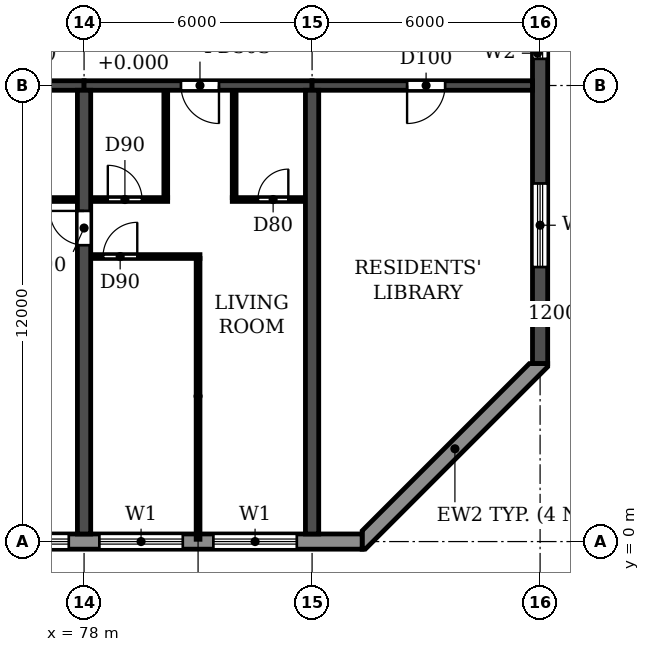
"""IFC4 building model, lengths in metres.
Left out: names, types, materials, properties, quantities, classifications, styles, units other than length and angle.
Written with IfcOpenShell. Run it as: python <this file> out.ifc"""

import sys

from ifc_helpers import new_model, si_unit, direction, frame, frame_2d, origin, place, context, subcontext, project, spatial, polyline, rectangle, outline, extrude, element, fill, save


model = new_model("IFC4")
c1 = context("Model", 3, precision=1e-05, world=origin(), true_north=direction((0.0, 1.0)))
c2 = subcontext(c1, "Body", "Model", "MODEL_VIEW")
j1 = project(units=[si_unit("LENGTHUNIT", "METRE"), si_unit("PLANEANGLEUNIT", "RADIAN")], contexts=[c1])
p1 = place(None, origin())
s1 = spatial("IfcSite", under=j1, at=p1, CompositionType="ELEMENT")
p2 = place(p1, origin())
s2 = spatial("IfcBuilding", under=s1, at=p2, CompositionType="ELEMENT")
p3 = place(p2, frame((0.0, 0.0, 112.5)))
s3 = spatial("IfcBuildingStorey", under=s2, at=p3, CompositionType="ELEMENT", Elevation=112.5)
p4 = place(p3, frame((78.0, 0.2, 0.0), z_axis=(0.0, 0.0, 1.0), x_axis=(0.0, 1.0, 0.0)))
e1 = element("IfcWall", 1, at=p4, inside=s3, PredefinedType="SHEAR", context=c2, shape_type="SweptSolid", body=[
    extrude(rectangle(XDim=11.675, YDim=0.35, at=frame_2d((5.837, 0.0))), origin(), (0.0, 0.0, 1.0), 2.95),
])
p5 = place(p4, frame((7.6, 0.0, 0.0)))
e2 = element("IfcOpeningElement", 2, at=p5, cuts=e1, PredefinedType="OPENING", context=c2, shape_type="SweptSolid", body=[
    extrude(rectangle(XDim=0.9, YDim=2.1, at=frame_2d((0.45, 1.05))), frame((0.0, 0.185, 0.0), z_axis=(0.0, -1.0, 0.0), x_axis=(1.0, 0.0, 0.0)), (0.0, 0.0, 1.0), 0.37),
])
p6 = place(p3, frame((84.0, 0.2, 0.0), z_axis=(0.0, 0.0, 1.0), x_axis=(0.0, 1.0, 0.0)))
e3 = element("IfcWall", 3, at=p6, inside=s3, PredefinedType="SHEAR", context=c2, shape_type="SweptSolid", body=[
    extrude(rectangle(XDim=11.675, YDim=0.35, at=frame_2d((5.837, 0.0))), origin(), (0.0, 0.0, 1.0), 2.95),
])
p7 = place(p3, frame((90.0, 4.683, 0.0), z_axis=(0.0, 0.0, 1.0), x_axis=(0.0, 1.0, 0.0)))
e4 = element("IfcWall", 4, at=p7, inside=s3, PredefinedType="SHEAR", context=c2, shape_type="SweptSolid", body=[
    extrude(rectangle(XDim=34.234, YDim=0.4, at=frame_2d((17.117, 0.0))), origin(), (0.0, 0.0, 1.0), 2.95),
])
p8 = place(p7, frame((15.917, 0.0, 0.9)))
e5 = element("IfcOpeningElement", 5, at=p8, cuts=e4, PredefinedType="OPENING", context=c2, shape_type="SweptSolid", body=[
    extrude(rectangle(XDim=1.2, YDim=1.5, at=frame_2d((0.6, 0.75))), frame((0.0, 0.21, 0.0), z_axis=(0.0, -1.0, 0.0), x_axis=(1.0, 0.0, 0.0)), (0.0, 0.0, 1.0), 0.42),
])
p9 = place(p7, frame((23.817, 0.0, 0.9)))
e6 = element("IfcOpeningElement", 6, at=p9, cuts=e4, PredefinedType="OPENING", context=c2, shape_type="SweptSolid", body=[
    extrude(rectangle(XDim=1.2, YDim=1.5, at=frame_2d((0.6, 0.75))), frame((0.0, 0.21, 0.0), z_axis=(0.0, -1.0, 0.0), x_axis=(1.0, 0.0, 0.0)), (0.0, 0.0, 1.0), 0.42),
])
p10 = place(p7, frame((8.017, 0.0, 0.9)))
e7 = element("IfcOpeningElement", 7, at=p10, cuts=e4, PredefinedType="OPENING", context=c2, shape_type="SweptSolid", body=[
    extrude(rectangle(XDim=1.2, YDim=1.5, at=frame_2d((0.6, 0.75))), frame((0.0, 0.21, 0.0), z_axis=(0.0, -1.0, 0.0), x_axis=(1.0, 0.0, 0.0)), (0.0, 0.0, 1.0), 0.42),
])
p11 = place(p7, frame((28.894, 0.0, 0.6)))
e8 = element("IfcOpeningElement", 8, at=p11, cuts=e4, PredefinedType="OPENING", context=c2, shape_type="SweptSolid", body=[
    extrude(rectangle(XDim=2.2, YDim=1.8, at=frame_2d((1.1, 0.9))), frame((0.0, 0.21, 0.0), z_axis=(0.0, -1.0, 0.0), x_axis=(1.0, 0.0, 0.0)), (0.0, 0.0, 1.0), 0.42),
])
p12 = place(p7, frame((2.541, 0.0, 0.6)))
e9 = element("IfcOpeningElement", 9, at=p12, cuts=e4, PredefinedType="OPENING", context=c2, shape_type="SweptSolid", body=[
    extrude(rectangle(XDim=2.2, YDim=1.8, at=frame_2d((1.1, 0.9))), frame((0.0, 0.21, 0.0), z_axis=(0.0, -1.0, 0.0), x_axis=(1.0, 0.0, 0.0)), (0.0, 0.0, 1.0), 0.42),
])
p13 = place(p3, frame((72.0, 12.0, 0.0), z_axis=(0.0, 0.0, 1.0), x_axis=(1.0, 0.0, 0.0)))
e10 = element("IfcWall", 10, at=p13, inside=s3, PredefinedType="SHEAR", context=c2, shape_type="SweptSolid", body=[
    extrude(rectangle(XDim=6.0, YDim=0.25, at=frame_2d((3.0, 0.0))), origin(), (0.0, 0.0, 1.0), 2.35),
])
p14 = place(p3, frame((78.0, 12.0, 0.0), z_axis=(0.0, 0.0, 1.0), x_axis=(1.0, 0.0, 0.0)))
e11 = element("IfcWall", 11, at=p14, inside=s3, PredefinedType="SHEAR", context=c2, shape_type="SweptSolid", body=[
    extrude(rectangle(XDim=6.0, YDim=0.25, at=frame_2d((3.0, 0.0))), origin(), (0.0, 0.0, 1.0), 2.35),
])
p15 = place(p14, frame((2.55, 0.0, 0.0)))
e12 = element("IfcOpeningElement", 12, at=p15, cuts=e11, PredefinedType="OPENING", context=c2, shape_type="SweptSolid", body=[
    extrude(rectangle(XDim=1.0, YDim=2.1, at=frame_2d((0.5, 1.05))), frame((0.0, 0.135, 0.0), z_axis=(0.0, -1.0, 0.0), x_axis=(1.0, 0.0, 0.0)), (0.0, 0.0, 1.0), 0.27),
])
p16 = place(p3, frame((84.0, 12.0, 0.0), z_axis=(0.0, 0.0, 1.0), x_axis=(1.0, 0.0, 0.0)))
e13 = element("IfcWall", 13, at=p16, inside=s3, PredefinedType="SHEAR", context=c2, shape_type="SweptSolid", body=[
    extrude(rectangle(XDim=5.8, YDim=0.25, at=frame_2d((2.9, 0.0))), origin(), (0.0, 0.0, 1.0), 2.35),
])
p17 = place(p16, frame((2.5, 0.0, 0.0)))
e14 = element("IfcOpeningElement", 14, at=p17, cuts=e13, PredefinedType="OPENING", context=c2, shape_type="SweptSolid", body=[
    extrude(rectangle(XDim=1.0, YDim=2.1, at=frame_2d((0.5, 1.05))), frame((0.0, 0.135, 0.0), z_axis=(0.0, -1.0, 0.0), x_axis=(1.0, 0.0, 0.0)), (0.0, 0.0, 1.0), 0.27),
])
p18 = place(p3, frame((16.683, 0.0, 0.0), z_axis=(0.0, 0.0, 1.0), x_axis=(1.0, 0.0, 0.0)))
e15 = element("IfcWall", 15, at=p18, inside=s3, PredefinedType="STANDARD", context=c2, shape_type="SweptSolid", body=[
    extrude(rectangle(XDim=68.634, YDim=0.4, at=frame_2d((34.317, 0.0))), origin(), (0.0, 0.0, 1.0), 2.95),
])
p19 = place(p18, frame((1.717, 0.0, 0.9)))
e16 = element("IfcOpeningElement", 16, at=p19, cuts=e15, PredefinedType="OPENING", context=c2, shape_type="SweptSolid", body=[
    extrude(rectangle(XDim=2.2, YDim=1.5, at=frame_2d((1.1, 0.75))), frame((0.0, 0.21, 0.0), z_axis=(0.0, -1.0, 0.0), x_axis=(1.0, 0.0, 0.0)), (0.0, 0.0, 1.0), 0.42),
])
p20 = place(p18, frame((4.717, 0.0, 0.9)))
e17 = element("IfcOpeningElement", 17, at=p20, cuts=e15, PredefinedType="OPENING", context=c2, shape_type="SweptSolid", body=[
    extrude(rectangle(XDim=2.2, YDim=1.5, at=frame_2d((1.1, 0.75))), frame((0.0, 0.21, 0.0), z_axis=(0.0, -1.0, 0.0), x_axis=(1.0, 0.0, 0.0)), (0.0, 0.0, 1.0), 0.42),
])
p21 = place(p18, frame((7.717, 0.0, 0.9)))
e18 = element("IfcOpeningElement", 18, at=p21, cuts=e15, PredefinedType="OPENING", context=c2, shape_type="SweptSolid", body=[
    extrude(rectangle(XDim=2.2, YDim=1.5, at=frame_2d((1.1, 0.75))), frame((0.0, 0.21, 0.0), z_axis=(0.0, -1.0, 0.0), x_axis=(1.0, 0.0, 0.0)), (0.0, 0.0, 1.0), 0.42),
])
p22 = place(p18, frame((10.917, 0.0, 0.0)))
e19 = element("IfcOpeningElement", 19, at=p22, cuts=e15, PredefinedType="OPENING", context=c2, shape_type="SweptSolid", body=[
    extrude(rectangle(XDim=1.8, YDim=2.4, at=frame_2d((0.9, 1.2))), frame((0.0, 0.21, 0.0), z_axis=(0.0, -1.0, 0.0), x_axis=(1.0, 0.0, 0.0)), (0.0, 0.0, 1.0), 0.42),
])
p23 = place(p18, frame((13.717, 0.0, 0.9)))
e20 = element("IfcOpeningElement", 20, at=p23, cuts=e15, PredefinedType="OPENING", context=c2, shape_type="SweptSolid", body=[
    extrude(rectangle(XDim=2.2, YDim=1.5, at=frame_2d((1.1, 0.75))), frame((0.0, 0.21, 0.0), z_axis=(0.0, -1.0, 0.0), x_axis=(1.0, 0.0, 0.0)), (0.0, 0.0, 1.0), 0.42),
])
p24 = place(p18, frame((16.717, 0.0, 0.9)))
e21 = element("IfcOpeningElement", 21, at=p24, cuts=e15, PredefinedType="OPENING", context=c2, shape_type="SweptSolid", body=[
    extrude(rectangle(XDim=2.2, YDim=1.5, at=frame_2d((1.1, 0.75))), frame((0.0, 0.21, 0.0), z_axis=(0.0, -1.0, 0.0), x_axis=(1.0, 0.0, 0.0)), (0.0, 0.0, 1.0), 0.42),
])
p25 = place(p18, frame((19.717, 0.0, 0.9)))
e22 = element("IfcOpeningElement", 22, at=p25, cuts=e15, PredefinedType="OPENING", context=c2, shape_type="SweptSolid", body=[
    extrude(rectangle(XDim=2.2, YDim=1.5, at=frame_2d((1.1, 0.75))), frame((0.0, 0.21, 0.0), z_axis=(0.0, -1.0, 0.0), x_axis=(1.0, 0.0, 0.0)), (0.0, 0.0, 1.0), 0.42),
])
p26 = place(p18, frame((22.717, 0.0, 0.9)))
e23 = element("IfcOpeningElement", 23, at=p26, cuts=e15, PredefinedType="OPENING", context=c2, shape_type="SweptSolid", body=[
    extrude(rectangle(XDim=2.2, YDim=1.5, at=frame_2d((1.1, 0.75))), frame((0.0, 0.21, 0.0), z_axis=(0.0, -1.0, 0.0), x_axis=(1.0, 0.0, 0.0)), (0.0, 0.0, 1.0), 0.42),
])
p27 = place(p18, frame((25.717, 0.0, 0.9)))
e24 = element("IfcOpeningElement", 24, at=p27, cuts=e15, PredefinedType="OPENING", context=c2, shape_type="SweptSolid", body=[
    extrude(rectangle(XDim=2.2, YDim=1.5, at=frame_2d((1.1, 0.75))), frame((0.0, 0.21, 0.0), z_axis=(0.0, -1.0, 0.0), x_axis=(1.0, 0.0, 0.0)), (0.0, 0.0, 1.0), 0.42),
])
p28 = place(p18, frame((28.717, 0.0, 0.9)))
e25 = element("IfcOpeningElement", 25, at=p28, cuts=e15, PredefinedType="OPENING", context=c2, shape_type="SweptSolid", body=[
    extrude(rectangle(XDim=2.2, YDim=1.5, at=frame_2d((1.1, 0.75))), frame((0.0, 0.21, 0.0), z_axis=(0.0, -1.0, 0.0), x_axis=(1.0, 0.0, 0.0)), (0.0, 0.0, 1.0), 0.42),
])
p29 = place(p18, frame((31.917, 0.0, 0.0)))
e26 = element("IfcOpeningElement", 26, at=p29, cuts=e15, PredefinedType="OPENING", context=c2, shape_type="SweptSolid", body=[
    extrude(rectangle(XDim=1.8, YDim=2.4, at=frame_2d((0.9, 1.2))), frame((0.0, 0.21, 0.0), z_axis=(0.0, -1.0, 0.0), x_axis=(1.0, 0.0, 0.0)), (0.0, 0.0, 1.0), 0.42),
])
p30 = place(p18, frame((34.717, 0.0, 0.9)))
e27 = element("IfcOpeningElement", 27, at=p30, cuts=e15, PredefinedType="OPENING", context=c2, shape_type="SweptSolid", body=[
    extrude(rectangle(XDim=2.2, YDim=1.5, at=frame_2d((1.1, 0.75))), frame((0.0, 0.21, 0.0), z_axis=(0.0, -1.0, 0.0), x_axis=(1.0, 0.0, 0.0)), (0.0, 0.0, 1.0), 0.42),
])
p31 = place(p18, frame((37.717, 0.0, 0.9)))
e28 = element("IfcOpeningElement", 28, at=p31, cuts=e15, PredefinedType="OPENING", context=c2, shape_type="SweptSolid", body=[
    extrude(rectangle(XDim=2.2, YDim=1.5, at=frame_2d((1.1, 0.75))), frame((0.0, 0.21, 0.0), z_axis=(0.0, -1.0, 0.0), x_axis=(1.0, 0.0, 0.0)), (0.0, 0.0, 1.0), 0.42),
])
p32 = place(p18, frame((40.717, 0.0, 0.9)))
e29 = element("IfcOpeningElement", 29, at=p32, cuts=e15, PredefinedType="OPENING", context=c2, shape_type="SweptSolid", body=[
    extrude(rectangle(XDim=2.2, YDim=1.5, at=frame_2d((1.1, 0.75))), frame((0.0, 0.21, 0.0), z_axis=(0.0, -1.0, 0.0), x_axis=(1.0, 0.0, 0.0)), (0.0, 0.0, 1.0), 0.42),
])
p33 = place(p18, frame((43.717, 0.0, 0.9)))
e30 = element("IfcOpeningElement", 30, at=p33, cuts=e15, PredefinedType="OPENING", context=c2, shape_type="SweptSolid", body=[
    extrude(rectangle(XDim=2.2, YDim=1.5, at=frame_2d((1.1, 0.75))), frame((0.0, 0.21, 0.0), z_axis=(0.0, -1.0, 0.0), x_axis=(1.0, 0.0, 0.0)), (0.0, 0.0, 1.0), 0.42),
])
p34 = place(p18, frame((46.917, 0.0, 0.0)))
e31 = element("IfcOpeningElement", 31, at=p34, cuts=e15, PredefinedType="OPENING", context=c2, shape_type="SweptSolid", body=[
    extrude(rectangle(XDim=1.8, YDim=2.4, at=frame_2d((0.9, 1.2))), frame((0.0, 0.21, 0.0), z_axis=(0.0, -1.0, 0.0), x_axis=(1.0, 0.0, 0.0)), (0.0, 0.0, 1.0), 0.42),
])
p35 = place(p18, frame((49.717, 0.0, 0.9)))
e32 = element("IfcOpeningElement", 32, at=p35, cuts=e15, PredefinedType="OPENING", context=c2, shape_type="SweptSolid", body=[
    extrude(rectangle(XDim=2.2, YDim=1.5, at=frame_2d((1.1, 0.75))), frame((0.0, 0.21, 0.0), z_axis=(0.0, -1.0, 0.0), x_axis=(1.0, 0.0, 0.0)), (0.0, 0.0, 1.0), 0.42),
])
p36 = place(p18, frame((52.717, 0.0, 0.9)))
e33 = element("IfcOpeningElement", 33, at=p36, cuts=e15, PredefinedType="OPENING", context=c2, shape_type="SweptSolid", body=[
    extrude(rectangle(XDim=2.2, YDim=1.5, at=frame_2d((1.1, 0.75))), frame((0.0, 0.21, 0.0), z_axis=(0.0, -1.0, 0.0), x_axis=(1.0, 0.0, 0.0)), (0.0, 0.0, 1.0), 0.42),
])
p37 = place(p18, frame((55.717, 0.0, 0.9)))
e34 = element("IfcOpeningElement", 34, at=p37, cuts=e15, PredefinedType="OPENING", context=c2, shape_type="SweptSolid", body=[
    extrude(rectangle(XDim=2.2, YDim=1.5, at=frame_2d((1.1, 0.75))), frame((0.0, 0.21, 0.0), z_axis=(0.0, -1.0, 0.0), x_axis=(1.0, 0.0, 0.0)), (0.0, 0.0, 1.0), 0.42),
])
p38 = place(p18, frame((58.717, 0.0, 0.9)))
e35 = element("IfcOpeningElement", 35, at=p38, cuts=e15, PredefinedType="OPENING", context=c2, shape_type="SweptSolid", body=[
    extrude(rectangle(XDim=2.2, YDim=1.5, at=frame_2d((1.1, 0.75))), frame((0.0, 0.21, 0.0), z_axis=(0.0, -1.0, 0.0), x_axis=(1.0, 0.0, 0.0)), (0.0, 0.0, 1.0), 0.42),
])
p39 = place(p18, frame((61.717, 0.0, 0.9)))
e36 = element("IfcOpeningElement", 36, at=p39, cuts=e15, PredefinedType="OPENING", context=c2, shape_type="SweptSolid", body=[
    extrude(rectangle(XDim=2.2, YDim=1.5, at=frame_2d((1.1, 0.75))), frame((0.0, 0.21, 0.0), z_axis=(0.0, -1.0, 0.0), x_axis=(1.0, 0.0, 0.0)), (0.0, 0.0, 1.0), 0.42),
])
p40 = place(p18, frame((64.717, 0.0, 0.9)))
e37 = element("IfcOpeningElement", 37, at=p40, cuts=e15, PredefinedType="OPENING", context=c2, shape_type="SweptSolid", body=[
    extrude(rectangle(XDim=2.2, YDim=1.5, at=frame_2d((1.1, 0.75))), frame((0.0, 0.21, 0.0), z_axis=(0.0, -1.0, 0.0), x_axis=(1.0, 0.0, 0.0)), (0.0, 0.0, 1.0), 0.42),
])
p41 = place(p3, origin())
e38 = element("IfcWall", 38, at=p41, inside=s3, PredefinedType="STANDARD", context=c2, shape_type="SweptSolid", body=[
    extrude(outline(polyline([(85.317, -0.2), (85.4, -0.2), (90.2, 4.6), (90.2, 4.683), (89.717, 4.683), (85.317, 0.283), (85.317, -0.2)])), origin(), (0.0, 0.0, 1.0), 2.95),
])
p42 = place(p3, frame((78.185, 7.5, 0.0), z_axis=(0.0, 0.0, 1.0), x_axis=(1.0, 0.0, 0.0)))
e39 = element("IfcWall", 39, at=p42, inside=s3, PredefinedType="PARTITIONING", context=c2, shape_type="SweptSolid", body=[
    extrude(rectangle(XDim=2.865, YDim=0.1, at=frame_2d((1.433, 0.0))), origin(), (0.0, 0.0, 1.0), 2.95),
])
p43 = place(p42, frame((0.315, 0.0, 0.0)))
e40 = element("IfcOpeningElement", 40, at=p43, cuts=e39, PredefinedType="OPENING", context=c2, shape_type="SweptSolid", body=[
    extrude(rectangle(XDim=0.9, YDim=2.1, at=frame_2d((0.45, 1.05))), frame((0.0, 0.06, 0.0), z_axis=(0.0, -1.0, 0.0), x_axis=(1.0, 0.0, 0.0)), (0.0, 0.0, 1.0), 0.12),
])
p44 = place(p3, frame((75.1, 9.0, 0.0), z_axis=(0.0, 0.0, 1.0), x_axis=(1.0, 0.0, 0.0)))
e41 = element("IfcWall", 41, at=p44, inside=s3, PredefinedType="PARTITIONING", context=c2, shape_type="SweptSolid", body=[
    extrude(rectangle(XDim=2.715, YDim=0.1, at=frame_2d((1.357, 0.0))), origin(), (0.0, 0.0, 1.0), 2.95),
])
p45 = place(p44, frame((1.0, 0.0, 0.0)))
e42 = element("IfcOpeningElement", 42, at=p45, cuts=e41, PredefinedType="OPENING", context=c2, shape_type="SweptSolid", body=[
    extrude(rectangle(XDim=0.8, YDim=2.1, at=frame_2d((0.4, 1.05))), frame((0.0, 0.06, 0.0), z_axis=(0.0, -1.0, 0.0), x_axis=(1.0, 0.0, 0.0)), (0.0, 0.0, 1.0), 0.12),
])
p46 = place(p3, frame((78.185, 9.0, 0.0), z_axis=(0.0, 0.0, 1.0), x_axis=(1.0, 0.0, 0.0)))
e43 = element("IfcWall", 43, at=p46, inside=s3, PredefinedType="PARTITIONING", context=c2, shape_type="SweptSolid", body=[
    extrude(rectangle(XDim=2.015, YDim=0.1, at=frame_2d((1.007, 0.0))), origin(), (0.0, 0.0, 1.0), 2.95),
])
p47 = place(p46, frame((0.44, 0.0, 0.0)))
e44 = element("IfcOpeningElement", 44, at=p47, cuts=e43, PredefinedType="OPENING", context=c2, shape_type="SweptSolid", body=[
    extrude(rectangle(XDim=0.9, YDim=2.1, at=frame_2d((0.45, 1.05))), frame((0.0, 0.06, 0.0), z_axis=(0.0, -1.0, 0.0), x_axis=(1.0, 0.0, 0.0)), (0.0, 0.0, 1.0), 0.12),
])
p48 = place(p3, frame((81.9, 9.0, 0.0), z_axis=(0.0, 0.0, 1.0), x_axis=(1.0, 0.0, 0.0)))
e45 = element("IfcWall", 45, at=p48, inside=s3, PredefinedType="PARTITIONING", context=c2, shape_type="SweptSolid", body=[
    extrude(rectangle(XDim=1.915, YDim=0.1, at=frame_2d((0.958, 0.0))), origin(), (0.0, 0.0, 1.0), 2.95),
])
p49 = place(p48, frame((0.675, 0.0, 0.0)))
e46 = element("IfcOpeningElement", 46, at=p49, cuts=e45, PredefinedType="OPENING", context=c2, shape_type="SweptSolid", body=[
    extrude(rectangle(XDim=0.8, YDim=2.1, at=frame_2d((0.4, 1.05))), frame((0.0, 0.06, 0.0), z_axis=(0.0, -1.0, 0.0), x_axis=(1.0, 0.0, 0.0)), (0.0, 0.0, 1.0), 0.12),
])
p50 = place(p3, frame((80.15, 9.05, 0.0), z_axis=(0.0, 0.0, 1.0), x_axis=(0.0, 1.0, 0.0)))
e47 = element("IfcWall", 47, at=p50, inside=s3, PredefinedType="PARTITIONING", context=c2, shape_type="SweptSolid", body=[
    extrude(rectangle(XDim=2.815, YDim=0.1, at=frame_2d((1.407, 0.0))), origin(), (0.0, 0.0, 1.0), 2.95),
])
p51 = place(p3, frame((81.0, 0.06, 0.0), z_axis=(0.0, 0.0, 1.0), x_axis=(0.0, 1.0, 0.0)))
e48 = element("IfcWall", 48, at=p51, inside=s3, PredefinedType="PARTITIONING", context=c2, shape_type="SweptSolid", body=[
    extrude(rectangle(XDim=7.39, YDim=0.1, at=frame_2d((3.695, 0.0))), origin(), (0.0, 0.0, 1.0), 2.95),
])
p52 = place(p3, frame((81.95, 9.05, 0.0), z_axis=(0.0, 0.0, 1.0), x_axis=(0.0, 1.0, 0.0)))
e49 = element("IfcWall", 49, at=p52, inside=s3, PredefinedType="PARTITIONING", context=c2, shape_type="SweptSolid", body=[
    extrude(rectangle(XDim=2.815, YDim=0.1, at=frame_2d((1.407, 0.0))), origin(), (0.0, 0.0, 1.0), 2.95),
])
p53 = place(p38, origin())
e50 = element("IfcWindow", 50, at=p53, inside=s3, PartitioningType="DOUBLE_PANEL_HORIZONTAL", PredefinedType="WINDOW", context=c2, shape_type="SweptSolid", body=[
    extrude(rectangle(XDim=2.2, YDim=1.5, at=frame_2d((1.1, 0.75))), frame((0.0, 0.03, 0.0), z_axis=(0.0, -1.0, 0.0), x_axis=(1.0, 0.0, 0.0)), (0.0, 0.0, 1.0), 0.06),
])
fill(e35, e50)
p54 = place(p39, origin())
e51 = element("IfcWindow", 51, at=p54, inside=s3, PartitioningType="DOUBLE_PANEL_HORIZONTAL", PredefinedType="WINDOW", context=c2, shape_type="SweptSolid", body=[
    extrude(rectangle(XDim=2.2, YDim=1.5, at=frame_2d((1.1, 0.75))), frame((0.0, 0.03, 0.0), z_axis=(0.0, -1.0, 0.0), x_axis=(1.0, 0.0, 0.0)), (0.0, 0.0, 1.0), 0.06),
])
fill(e36, e51)
p55 = place(p40, origin())
e52 = element("IfcWindow", 52, at=p55, inside=s3, PartitioningType="DOUBLE_PANEL_HORIZONTAL", PredefinedType="WINDOW", context=c2, shape_type="SweptSolid", body=[
    extrude(rectangle(XDim=2.2, YDim=1.5, at=frame_2d((1.1, 0.75))), frame((0.0, 0.03, 0.0), z_axis=(0.0, -1.0, 0.0), x_axis=(1.0, 0.0, 0.0)), (0.0, 0.0, 1.0), 0.06),
])
fill(e37, e52)
p56 = place(p10, origin())
e53 = element("IfcWindow", 53, at=p56, inside=s3, PartitioningType="SINGLE_PANEL", PredefinedType="WINDOW", context=c2, shape_type="SweptSolid", body=[
    extrude(rectangle(XDim=1.2, YDim=1.5, at=frame_2d((0.6, 0.75))), frame((0.0, 0.03, 0.0), z_axis=(0.0, -1.0, 0.0), x_axis=(1.0, 0.0, 0.0)), (0.0, 0.0, 1.0), 0.06),
])
fill(e7, e53)
p57 = place(p12, origin())
e54 = element("IfcWindow", 54, at=p57, inside=s3, PartitioningType="DOUBLE_PANEL_HORIZONTAL", PredefinedType="WINDOW", context=c2, shape_type="SweptSolid", body=[
    extrude(rectangle(XDim=2.2, YDim=1.8, at=frame_2d((1.1, 0.9))), frame((0.0, 0.03, 0.0), z_axis=(0.0, -1.0, 0.0), x_axis=(1.0, 0.0, 0.0)), (0.0, 0.0, 1.0), 0.06),
])
fill(e9, e54)
p58 = place(p5, origin())
e55 = element("IfcDoor", 55, at=p58, inside=s3, OperationType="SINGLE_SWING_RIGHT", PredefinedType="DOOR", context=c2, shape_type="SweptSolid", body=[
    extrude(rectangle(XDim=0.9, YDim=2.1, at=frame_2d((0.45, 1.05))), frame((0.0, 0.025, 0.0), z_axis=(0.0, -1.0, 0.0), x_axis=(1.0, 0.0, 0.0)), (0.0, 0.0, 1.0), 0.05),
])
fill(e2, e55)
p59 = place(p43, origin())
e56 = element("IfcDoor", 56, at=p59, inside=s3, OperationType="SINGLE_SWING_RIGHT", PredefinedType="DOOR", context=c2, shape_type="SweptSolid", body=[
    extrude(rectangle(XDim=0.9, YDim=2.1, at=frame_2d((0.45, 1.05))), frame((0.0, 0.025, 0.0), z_axis=(0.0, -1.0, 0.0), x_axis=(1.0, 0.0, 0.0)), (0.0, 0.0, 1.0), 0.05),
])
fill(e40, e56)
p60 = place(p47, origin())
e57 = element("IfcDoor", 57, at=p60, inside=s3, OperationType="SINGLE_SWING_LEFT", PredefinedType="DOOR", context=c2, shape_type="SweptSolid", body=[
    extrude(rectangle(XDim=0.9, YDim=2.1, at=frame_2d((0.45, 1.05))), frame((0.0, 0.025, 0.0), z_axis=(0.0, -1.0, 0.0), x_axis=(1.0, 0.0, 0.0)), (0.0, 0.0, 1.0), 0.05),
])
fill(e44, e57)
p61 = place(p15, frame((1.0, 0.0, 0.0), z_axis=(0.0, 0.0, 1.0), x_axis=(-1.0, 0.0, 0.0)))
e58 = element("IfcDoor", 58, at=p61, inside=s3, OperationType="SINGLE_SWING_LEFT", PredefinedType="DOOR", context=c2, shape_type="SweptSolid", body=[
    extrude(rectangle(XDim=1.0, YDim=2.1, at=frame_2d((0.5, 1.05))), frame((0.0, 0.025, 0.0), z_axis=(0.0, -1.0, 0.0), x_axis=(1.0, 0.0, 0.0)), (0.0, 0.0, 1.0), 0.05),
])
fill(e12, e58)
p62 = place(p49, origin())
e59 = element("IfcDoor", 59, at=p62, inside=s3, OperationType="SINGLE_SWING_RIGHT", PredefinedType="DOOR", context=c2, shape_type="SweptSolid", body=[
    extrude(rectangle(XDim=0.8, YDim=2.1, at=frame_2d((0.4, 1.05))), frame((0.0, 0.025, 0.0), z_axis=(0.0, -1.0, 0.0), x_axis=(1.0, 0.0, 0.0)), (0.0, 0.0, 1.0), 0.05),
])
fill(e46, e59)
p63 = place(p17, frame((1.0, 0.0, 0.0), z_axis=(0.0, 0.0, 1.0), x_axis=(-1.0, 0.0, 0.0)))
e60 = element("IfcDoor", 60, at=p63, inside=s3, OperationType="SINGLE_SWING_RIGHT", PredefinedType="DOOR", context=c2, shape_type="SweptSolid", body=[
    extrude(rectangle(XDim=1.0, YDim=2.1, at=frame_2d((0.5, 1.05))), frame((0.0, 0.025, 0.0), z_axis=(0.0, -1.0, 0.0), x_axis=(1.0, 0.0, 0.0)), (0.0, 0.0, 1.0), 0.05),
])
fill(e14, e60)
save(model, sys.argv[1])
